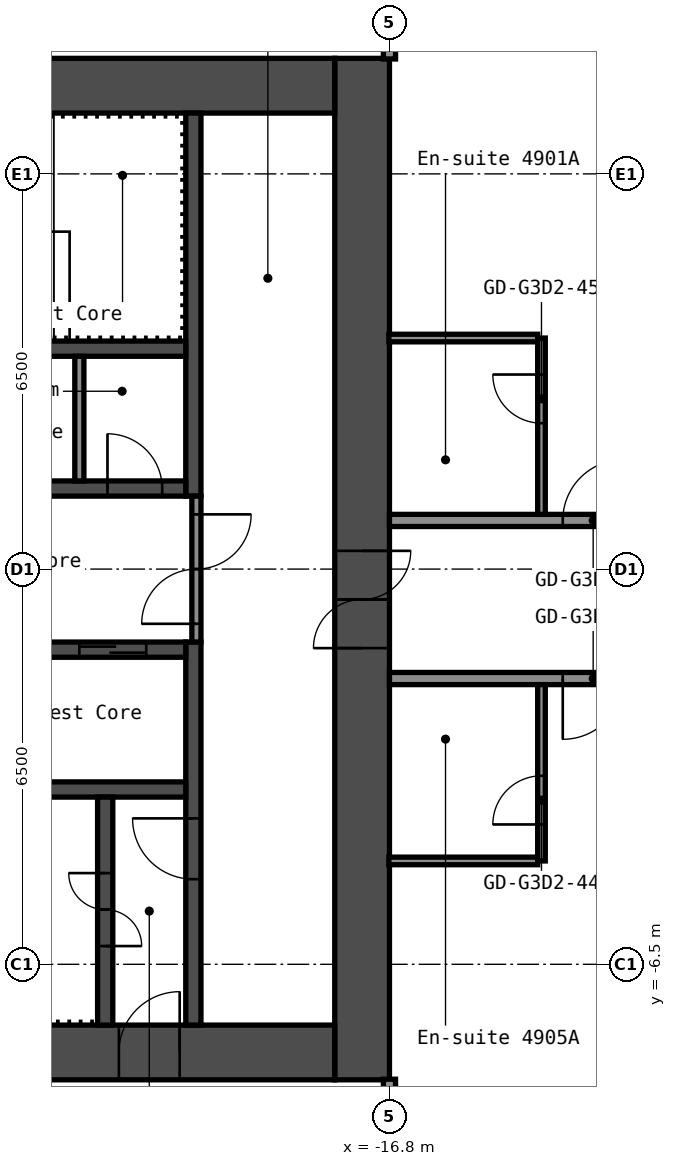
"""IFC4 building model, lengths in metres.
Left out: names, types, materials, properties, quantities, classifications, styles, units other than length and angle.
Written with IfcOpenShell. Run it as: python <this file> out.ifc"""

import sys

from ifc_helpers import new_model, si_unit, direction, frame, frame_2d, origin, place, context, subcontext, project, spatial, rectangle, extrude, element, fill, save


model = new_model("IFC4")
c1 = context("Model", 3, precision=1e-05, world=origin(), true_north=direction((0.0, 1.0)))
c2 = subcontext(c1, "Body", "Model", "MODEL_VIEW")
j1 = project(units=[si_unit("LENGTHUNIT", "METRE"), si_unit("PLANEANGLEUNIT", "RADIAN")], contexts=[c1])
p1 = place(None, origin())
s1 = spatial("IfcSite", under=j1, at=p1, CompositionType="ELEMENT")
p2 = place(p1, origin())
s2 = spatial("IfcBuilding", under=s1, at=p2, CompositionType="ELEMENT")
p3 = place(p2, frame((0.0, 0.0, 172.6)))
s3 = spatial("IfcBuildingStorey", under=s2, at=p3, CompositionType="ELEMENT", Elevation=172.6)
p4 = place(p3, frame((-17.25, -8.4, 0.0), z_axis=(0.0, 0.0, 1.0), x_axis=(0.0, 1.0, 0.0)))
e1 = element("IfcWall", 1, at=p4, inside=s3, PredefinedType="SHEAR", context=c2, shape_type="SweptSolid", body=[
    extrude(rectangle(XDim=16.8, YDim=0.9, at=frame_2d((8.4, 0.0))), origin(), (0.0, 0.0, 1.0), 2.9),
])
p5 = place(p4, frame((7.1, 0.0, 0.0)))
e2 = element("IfcOpeningElement", 2, at=p5, cuts=e1, PredefinedType="OPENING", context=c2, shape_type="SweptSolid", body=[
    extrude(rectangle(XDim=1.6, YDim=2.1, at=frame_2d((0.8, 1.05))), frame((0.0, 0.46, 0.0), z_axis=(0.0, -1.0, 0.0), x_axis=(1.0, 0.0, 0.0)), (0.0, 0.0, 1.0), 0.92),
])
p6 = place(p3, frame((-32.7, 7.95, 0.0), z_axis=(0.0, 0.0, 1.0), x_axis=(1.0, 0.0, 0.0)))
e3 = element("IfcWall", 3, at=p6, inside=s3, PredefinedType="SHEAR", context=c2, shape_type="SweptSolid", body=[
    extrude(rectangle(XDim=15.0, YDim=0.9, at=frame_2d((7.5, 0.0))), origin(), (0.0, 0.0, 1.0), 2.9),
])
p7 = place(p6, frame((3.4, 0.0, 0.0)))
e4 = element("IfcOpeningElement", 4, at=p7, cuts=e3, PredefinedType="OPENING", context=c2, shape_type="SweptSolid", body=[
    extrude(rectangle(XDim=1.2, YDim=2.1, at=frame_2d((0.6, 1.05))), frame((0.0, 0.46, 0.0), z_axis=(0.0, -1.0, 0.0), x_axis=(1.0, 0.0, 0.0)), (0.0, 0.0, 1.0), 0.92),
])
p8 = place(p6, frame((0.75, 0.0, 0.0)))
e5 = element("IfcOpeningElement", 5, at=p8, cuts=e3, PredefinedType="OPENING", context=c2, shape_type="SweptSolid", body=[
    extrude(rectangle(XDim=0.9, YDim=2.1, at=frame_2d((0.45, 1.05))), frame((0.0, 0.46, 0.0), z_axis=(0.0, -1.0, 0.0), x_axis=(1.0, 0.0, 0.0)), (0.0, 0.0, 1.0), 0.92),
])
p9 = place(p3, frame((-32.7, -7.95, 0.0), z_axis=(0.0, 0.0, 1.0), x_axis=(1.0, 0.0, 0.0)))
e6 = element("IfcWall", 6, at=p9, inside=s3, PredefinedType="SHEAR", context=c2, shape_type="SweptSolid", body=[
    extrude(rectangle(XDim=15.0, YDim=0.9, at=frame_2d((7.5, 0.0))), origin(), (0.0, 0.0, 1.0), 2.9),
])
p10 = place(p9, frame((11.45, 0.0, 0.0)))
e7 = element("IfcOpeningElement", 7, at=p10, cuts=e6, PredefinedType="OPENING", context=c2, shape_type="SweptSolid", body=[
    extrude(rectangle(XDim=1.0, YDim=2.1, at=frame_2d((0.5, 1.05))), frame((0.0, 0.46, 0.0), z_axis=(0.0, -1.0, 0.0), x_axis=(1.0, 0.0, 0.0)), (0.0, 0.0, 1.0), 0.92),
])
p11 = place(p3, frame((-20.025, 1.2, 0.0), z_axis=(0.0, 0.0, 1.0), x_axis=(0.0, 1.0, 0.0)))
e8 = element("IfcWall", 8, at=p11, inside=s3, PredefinedType="SHEAR", context=c2, shape_type="SweptSolid", body=[
    extrude(rectangle(XDim=6.3, YDim=0.25, at=frame_2d((3.15, 0.0))), origin(), (0.0, 0.0, 1.0), 2.9),
])
p12 = place(p3, frame((-20.025, -7.5, 0.0), z_axis=(0.0, 0.0, 1.0), x_axis=(0.0, 1.0, 0.0)))
e9 = element("IfcWall", 9, at=p12, inside=s3, PredefinedType="SHEAR", context=c2, shape_type="SweptSolid", body=[
    extrude(rectangle(XDim=6.3, YDim=0.25, at=frame_2d((3.15, 0.0))), origin(), (0.0, 0.0, 1.0), 2.9),
])
p13 = place(p12, frame((2.4, 0.0, 0.0)))
e10 = element("IfcOpeningElement", 10, at=p13, cuts=e9, PredefinedType="OPENING", context=c2, shape_type="SweptSolid", body=[
    extrude(rectangle(XDim=1.0, YDim=2.1, at=frame_2d((0.5, 1.05))), frame((0.0, 0.135, 0.0), z_axis=(0.0, -1.0, 0.0), x_axis=(1.0, 0.0, 0.0)), (0.0, 0.0, 1.0), 0.27),
])
p14 = place(p3, frame((-27.65, 1.325, 0.0), z_axis=(0.0, 0.0, 1.0), x_axis=(1.0, 0.0, 0.0)))
e11 = element("IfcWall", 11, at=p14, inside=s3, PredefinedType="SHEAR", context=c2, shape_type="SweptSolid", body=[
    extrude(rectangle(XDim=7.5, YDim=0.25, at=frame_2d((3.75, 0.0))), origin(), (0.0, 0.0, 1.0), 2.9),
])
p15 = place(p14, frame((6.212, 0.0, 0.0)))
e12 = element("IfcOpeningElement", 12, at=p15, cuts=e11, PredefinedType="OPENING", context=c2, shape_type="SweptSolid", body=[
    extrude(rectangle(XDim=0.9, YDim=2.1, at=frame_2d((0.45, 1.05))), frame((0.0, 0.135, 0.0), z_axis=(0.0, -1.0, 0.0), x_axis=(1.0, 0.0, 0.0)), (0.0, 0.0, 1.0), 0.27),
])
p16 = place(p14, frame((2.512, 0.0, 0.0)))
e13 = element("IfcOpeningElement", 13, at=p16, cuts=e11, PredefinedType="OPENING", context=c2, shape_type="SweptSolid", body=[
    extrude(rectangle(XDim=0.9, YDim=2.1, at=frame_2d((0.45, 1.05))), frame((0.0, 0.135, 0.0), z_axis=(0.0, -1.0, 0.0), x_axis=(1.0, 0.0, 0.0)), (0.0, 0.0, 1.0), 0.27),
])
p17 = place(p3, frame((-27.65, 3.625, 0.0), z_axis=(0.0, 0.0, 1.0), x_axis=(1.0, 0.0, 0.0)))
e14 = element("IfcWall", 14, at=p17, inside=s3, PredefinedType="SHEAR", context=c2, shape_type="SweptSolid", body=[
    extrude(rectangle(XDim=7.5, YDim=0.25, at=frame_2d((3.75, 0.0))), origin(), (0.0, 0.0, 1.0), 2.9),
])
p18 = place(p3, frame((-27.65, -1.325, 0.0), z_axis=(0.0, 0.0, 1.0), x_axis=(1.0, 0.0, 0.0)))
e15 = element("IfcWall", 15, at=p18, inside=s3, PredefinedType="SHEAR", context=c2, shape_type="SweptSolid", body=[
    extrude(rectangle(XDim=7.5, YDim=0.25, at=frame_2d((3.75, 0.0))), origin(), (0.0, 0.0, 1.0), 2.9),
])
p19 = place(p18, frame((5.75, 0.0, 0.0)))
e16 = element("IfcOpeningElement", 16, at=p19, cuts=e15, PredefinedType="OPENING", context=c2, shape_type="SweptSolid", body=[
    extrude(rectangle(XDim=1.1, YDim=2.1, at=frame_2d((0.55, 1.05))), frame((0.0, 0.135, 0.0), z_axis=(0.0, -1.0, 0.0), x_axis=(1.0, 0.0, 0.0)), (0.0, 0.0, 1.0), 0.27),
])
p20 = place(p18, frame((3.35, 0.0, 0.0)))
e17 = element("IfcOpeningElement", 17, at=p20, cuts=e15, PredefinedType="OPENING", context=c2, shape_type="SweptSolid", body=[
    extrude(rectangle(XDim=1.1, YDim=2.1, at=frame_2d((0.55, 1.05))), frame((0.0, 0.135, 0.0), z_axis=(0.0, -1.0, 0.0), x_axis=(1.0, 0.0, 0.0)), (0.0, 0.0, 1.0), 0.27),
])
p21 = place(p18, frame((0.95, 0.0, 0.0)))
e18 = element("IfcOpeningElement", 18, at=p21, cuts=e15, PredefinedType="OPENING", context=c2, shape_type="SweptSolid", body=[
    extrude(rectangle(XDim=1.1, YDim=2.1, at=frame_2d((0.55, 1.05))), frame((0.0, 0.135, 0.0), z_axis=(0.0, -1.0, 0.0), x_axis=(1.0, 0.0, 0.0)), (0.0, 0.0, 1.0), 0.27),
])
p22 = place(p3, frame((-27.65, -3.625, 0.0), z_axis=(0.0, 0.0, 1.0), x_axis=(1.0, 0.0, 0.0)))
e19 = element("IfcWall", 19, at=p22, inside=s3, PredefinedType="SHEAR", context=c2, shape_type="SweptSolid", body=[
    extrude(rectangle(XDim=7.5, YDim=0.25, at=frame_2d((3.75, 0.0))), origin(), (0.0, 0.0, 1.0), 2.9),
])
p23 = place(p3, frame((-21.475, -7.5, 0.0), z_axis=(0.0, 0.0, 1.0), x_axis=(0.0, 1.0, 0.0)))
e20 = element("IfcWall", 20, at=p23, inside=s3, PredefinedType="SHEAR", context=c2, shape_type="SweptSolid", body=[
    extrude(rectangle(XDim=3.75, YDim=0.25, at=frame_2d((1.875, 0.0))), origin(), (0.0, 0.0, 1.0), 2.9),
])
p24 = place(p23, frame((1.3, 0.0, 0.0)))
e21 = element("IfcOpeningElement", 21, at=p24, cuts=e20, PredefinedType="OPENING", context=c2, shape_type="SweptSolid", body=[
    extrude(rectangle(XDim=1.2, YDim=2.1, at=frame_2d((0.6, 1.05))), frame((0.0, 0.135, 0.0), z_axis=(0.0, -1.0, 0.0), x_axis=(1.0, 0.0, 0.0)), (0.0, 0.0, 1.0), 0.27),
])
p25 = place(p3, frame((-19.975, -1.2, 0.0), z_axis=(0.0, 0.0, 1.0), x_axis=(0.0, 1.0, 0.0)))
e22 = element("IfcWall", 22, at=p25, inside=s3, PredefinedType="PARTITIONING", context=c2, shape_type="SweptSolid", body=[
    extrude(rectangle(XDim=2.4, YDim=0.15, at=frame_2d((1.2, 0.0))), origin(), (0.0, 0.0, 1.0), 2.9),
])
p26 = place(p25, frame((0.3, 0.0, 0.0)))
e23 = element("IfcOpeningElement", 23, at=p26, cuts=e22, PredefinedType="OPENING", context=c2, shape_type="SweptSolid", body=[
    extrude(rectangle(XDim=1.8, YDim=2.1, at=frame_2d((0.9, 1.05))), frame((0.0, 0.085, 0.0), z_axis=(0.0, -1.0, 0.0), x_axis=(1.0, 0.0, 0.0)), (0.0, 0.0, 1.0), 0.17),
])
p27 = place(p3, frame((-21.9, 1.45, 0.0), z_axis=(0.0, 0.0, 1.0), x_axis=(0.0, 1.0, 0.0)))
e24 = element("IfcWall", 24, at=p27, inside=s3, PredefinedType="PARTITIONING", context=c2, shape_type="SweptSolid", body=[
    extrude(rectangle(XDim=2.05, YDim=0.15, at=frame_2d((1.025, 0.0))), origin(), (0.0, 0.0, 1.0), 2.9),
])
p28 = place(p3, frame((-16.81, -4.8, 0.0), z_axis=(0.0, 0.0, 1.0), x_axis=(1.0, 0.0, 0.0)))
e25 = element("IfcWall", 25, at=p28, inside=s3, PredefinedType="PARTITIONING", context=c2, shape_type="SweptSolid", body=[
    extrude(rectangle(XDim=2.448, YDim=0.125, at=frame_2d((1.224, 0.0))), origin(), (0.0, 0.0, 1.0), 2.9),
])
p29 = place(p3, frame((-16.8, -1.8, 0.0), z_axis=(0.0, 0.0, 1.0), x_axis=(1.0, 0.0, 0.0)))
e26 = element("IfcWall", 26, at=p29, inside=s3, PredefinedType="PARTITIONING", context=c2, shape_type="SweptSolid", body=[
    extrude(rectangle(XDim=33.6, YDim=0.2, at=frame_2d((16.8, 0.0))), origin(), (0.0, 0.0, 1.0), 2.9),
])
p30 = place(p29, frame((2.85, 0.0, 0.0)))
e27 = element("IfcOpeningElement", 27, at=p30, cuts=e26, PredefinedType="OPENING", context=c2, shape_type="SweptSolid", body=[
    extrude(rectangle(XDim=1.0, YDim=2.1, at=frame_2d((0.5, 1.05))), frame((0.0, 0.11, 0.0), z_axis=(0.0, -1.0, 0.0), x_axis=(1.0, 0.0, 0.0)), (0.0, 0.0, 1.0), 0.22),
])
p31 = place(p29, frame((4.55, 0.0, 0.0)))
e28 = element("IfcOpeningElement", 28, at=p31, cuts=e26, PredefinedType="OPENING", context=c2, shape_type="SweptSolid", body=[
    extrude(rectangle(XDim=1.0, YDim=2.1, at=frame_2d((0.5, 1.05))), frame((0.0, 0.11, 0.0), z_axis=(0.0, -1.0, 0.0), x_axis=(1.0, 0.0, 0.0)), (0.0, 0.0, 1.0), 0.22),
])
p32 = place(p29, frame((12.1, 0.0, 0.0)))
e29 = element("IfcOpeningElement", 29, at=p32, cuts=e26, PredefinedType="OPENING", context=c2, shape_type="SweptSolid", body=[
    extrude(rectangle(XDim=1.0, YDim=2.1, at=frame_2d((0.5, 1.05))), frame((0.0, 0.11, 0.0), z_axis=(0.0, -1.0, 0.0), x_axis=(1.0, 0.0, 0.0)), (0.0, 0.0, 1.0), 0.22),
])
p33 = place(p29, frame((19.65, 0.0, 0.0)))
e30 = element("IfcOpeningElement", 30, at=p33, cuts=e26, PredefinedType="OPENING", context=c2, shape_type="SweptSolid", body=[
    extrude(rectangle(XDim=1.0, YDim=2.1, at=frame_2d((0.5, 1.05))), frame((0.0, 0.11, 0.0), z_axis=(0.0, -1.0, 0.0), x_axis=(1.0, 0.0, 0.0)), (0.0, 0.0, 1.0), 0.22),
])
p34 = place(p29, frame((21.35, 0.0, 0.0)))
e31 = element("IfcOpeningElement", 31, at=p34, cuts=e26, PredefinedType="OPENING", context=c2, shape_type="SweptSolid", body=[
    extrude(rectangle(XDim=1.0, YDim=2.1, at=frame_2d((0.5, 1.05))), frame((0.0, 0.11, 0.0), z_axis=(0.0, -1.0, 0.0), x_axis=(1.0, 0.0, 0.0)), (0.0, 0.0, 1.0), 0.22),
])
p35 = place(p29, frame((27.2, 0.0, 0.0)))
e32 = element("IfcOpeningElement", 32, at=p35, cuts=e26, PredefinedType="OPENING", context=c2, shape_type="SweptSolid", body=[
    extrude(rectangle(XDim=1.0, YDim=2.1, at=frame_2d((0.5, 1.05))), frame((0.0, 0.11, 0.0), z_axis=(0.0, -1.0, 0.0), x_axis=(1.0, 0.0, 0.0)), (0.0, 0.0, 1.0), 0.22),
])
p36 = place(p3, frame((-16.8, 0.8, 0.0), z_axis=(0.0, 0.0, 1.0), x_axis=(1.0, 0.0, 0.0)))
e33 = element("IfcWall", 33, at=p36, inside=s3, PredefinedType="PARTITIONING", context=c2, shape_type="SweptSolid", body=[
    extrude(rectangle(XDim=33.6, YDim=0.2, at=frame_2d((16.8, 0.0))), origin(), (0.0, 0.0, 1.0), 2.9),
])
p37 = place(p36, frame((2.85, 0.0, 0.0)))
e34 = element("IfcOpeningElement", 34, at=p37, cuts=e33, PredefinedType="OPENING", context=c2, shape_type="SweptSolid", body=[
    extrude(rectangle(XDim=1.0, YDim=2.1, at=frame_2d((0.5, 1.05))), frame((0.0, 0.11, 0.0), z_axis=(0.0, -1.0, 0.0), x_axis=(1.0, 0.0, 0.0)), (0.0, 0.0, 1.0), 0.22),
])
p38 = place(p36, frame((4.55, 0.0, 0.0)))
e35 = element("IfcOpeningElement", 35, at=p38, cuts=e33, PredefinedType="OPENING", context=c2, shape_type="SweptSolid", body=[
    extrude(rectangle(XDim=1.0, YDim=2.1, at=frame_2d((0.5, 1.05))), frame((0.0, 0.11, 0.0), z_axis=(0.0, -1.0, 0.0), x_axis=(1.0, 0.0, 0.0)), (0.0, 0.0, 1.0), 0.22),
])
p39 = place(p36, frame((13.8, 0.0, 0.0)))
e36 = element("IfcOpeningElement", 36, at=p39, cuts=e33, PredefinedType="OPENING", context=c2, shape_type="SweptSolid", body=[
    extrude(rectangle(XDim=1.0, YDim=2.1, at=frame_2d((0.5, 1.05))), frame((0.0, 0.11, 0.0), z_axis=(0.0, -1.0, 0.0), x_axis=(1.0, 0.0, 0.0)), (0.0, 0.0, 1.0), 0.22),
])
p40 = place(p36, frame((19.65, 0.0, 0.0)))
e37 = element("IfcOpeningElement", 37, at=p40, cuts=e33, PredefinedType="OPENING", context=c2, shape_type="SweptSolid", body=[
    extrude(rectangle(XDim=1.0, YDim=2.1, at=frame_2d((0.5, 1.05))), frame((0.0, 0.11, 0.0), z_axis=(0.0, -1.0, 0.0), x_axis=(1.0, 0.0, 0.0)), (0.0, 0.0, 1.0), 0.22),
])
p41 = place(p36, frame((21.35, 0.0, 0.0)))
e38 = element("IfcOpeningElement", 38, at=p41, cuts=e33, PredefinedType="OPENING", context=c2, shape_type="SweptSolid", body=[
    extrude(rectangle(XDim=1.0, YDim=2.1, at=frame_2d((0.5, 1.05))), frame((0.0, 0.11, 0.0), z_axis=(0.0, -1.0, 0.0), x_axis=(1.0, 0.0, 0.0)), (0.0, 0.0, 1.0), 0.22),
])
p42 = place(p36, frame((27.1, 0.0, 0.0)))
e39 = element("IfcOpeningElement", 39, at=p42, cuts=e33, PredefinedType="OPENING", context=c2, shape_type="SweptSolid", body=[
    extrude(rectangle(XDim=1.0, YDim=2.1, at=frame_2d((0.5, 1.05))), frame((0.0, 0.11, 0.0), z_axis=(0.0, -1.0, 0.0), x_axis=(1.0, 0.0, 0.0)), (0.0, 0.0, 1.0), 0.22),
])
p43 = place(p3, frame((-16.81, 3.8, 0.0), z_axis=(0.0, 0.0, 1.0), x_axis=(1.0, 0.0, 0.0)))
e40 = element("IfcWall", 40, at=p43, inside=s3, PredefinedType="PARTITIONING", context=c2, shape_type="SweptSolid", body=[
    extrude(rectangle(XDim=2.448, YDim=0.125, at=frame_2d((1.224, 0.0))), origin(), (0.0, 0.0, 1.0), 2.9),
])
p44 = place(p3, frame((-16.8, -19.3, 0.0), z_axis=(0.0, 0.0, 1.0), x_axis=(0.0, 1.0, 0.0)))
e41 = element("IfcWall", 41, at=p44, inside=s3, PredefinedType="PARTITIONING", context=c2, shape_type="SweptSolid", body=[
    extrude(rectangle(XDim=10.91, YDim=0.2, at=frame_2d((5.455, 0.0))), origin(), (0.0, 0.0, 1.0), 2.9),
])
p45 = place(p3, frame((-16.8, 8.39, 0.0), z_axis=(0.0, 0.0, 1.0), x_axis=(0.0, 1.0, 0.0)))
e42 = element("IfcWall", 42, at=p45, inside=s3, PredefinedType="PARTITIONING", context=c2, shape_type="SweptSolid", body=[
    extrude(rectangle(XDim=9.91, YDim=0.2, at=frame_2d((4.955, 0.0))), origin(), (0.0, 0.0, 1.0), 2.9),
])
p46 = place(p3, frame((-14.3, -4.8, 0.0), z_axis=(0.0, 0.0, 1.0), x_axis=(0.0, 1.0, 0.0)))
e43 = element("IfcWall", 43, at=p46, inside=s3, PredefinedType="PARTITIONING", context=c2, shape_type="SweptSolid", body=[
    extrude(rectangle(XDim=2.9, YDim=0.125, at=frame_2d((1.45, 0.0))), origin(), (0.0, 0.0, 1.0), 2.9),
])
p47 = place(p46, frame((0.6, 0.0, 0.0)))
e44 = element("IfcOpeningElement", 44, at=p47, cuts=e43, PredefinedType="OPENING", context=c2, shape_type="SweptSolid", body=[
    extrude(rectangle(XDim=0.8, YDim=2.1, at=frame_2d((0.4, 1.05))), frame((0.0, 0.073, 0.0), z_axis=(0.0, -1.0, 0.0), x_axis=(1.0, 0.0, 0.0)), (0.0, 0.0, 1.0), 0.145),
])
p48 = place(p3, frame((-14.3, 0.9, 0.0), z_axis=(0.0, 0.0, 1.0), x_axis=(0.0, 1.0, 0.0)))
e45 = element("IfcWall", 45, at=p48, inside=s3, PredefinedType="PARTITIONING", context=c2, shape_type="SweptSolid", body=[
    extrude(rectangle(XDim=2.9, YDim=0.125, at=frame_2d((1.45, 0.0))), origin(), (0.0, 0.0, 1.0), 2.9),
])
p49 = place(p48, frame((1.5, 0.0, 0.0)))
e46 = element("IfcOpeningElement", 46, at=p49, cuts=e45, PredefinedType="OPENING", context=c2, shape_type="SweptSolid", body=[
    extrude(rectangle(XDim=0.8, YDim=2.1, at=frame_2d((0.4, 1.05))), frame((0.0, 0.073, 0.0), z_axis=(0.0, -1.0, 0.0), x_axis=(1.0, 0.0, 0.0)), (0.0, 0.0, 1.0), 0.145),
])
p50 = place(p5, origin())
e47 = element("IfcDoor", 47, at=p50, inside=s3, OperationType="DOUBLE_DOOR_SINGLE_SWING", PredefinedType="DOOR", context=c2, shape_type="SweptSolid", body=[
    extrude(rectangle(XDim=1.6, YDim=2.1, at=frame_2d((0.8, 1.05))), frame((0.0, 0.025, 0.0), z_axis=(0.0, -1.0, 0.0), x_axis=(1.0, 0.0, 0.0)), (0.0, 0.0, 1.0), 0.05),
])
fill(e2, e47)
p51 = place(p10, origin())
e48 = element("IfcDoor", 48, at=p51, inside=s3, OperationType="SINGLE_SWING_LEFT", PredefinedType="DOOR", context=c2, shape_type="SweptSolid", body=[
    extrude(rectangle(XDim=1.0, YDim=2.1, at=frame_2d((0.5, 1.05))), frame((0.0, 0.025, 0.0), z_axis=(0.0, -1.0, 0.0), x_axis=(1.0, 0.0, 0.0)), (0.0, 0.0, 1.0), 0.05),
])
fill(e7, e48)
p52 = place(p24, origin())
e49 = element("IfcDoor", 49, at=p52, inside=s3, OperationType="DOUBLE_DOOR_SINGLE_SWING", PredefinedType="DOOR", context=c2, shape_type="SweptSolid", body=[
    extrude(rectangle(XDim=1.2, YDim=2.1, at=frame_2d((0.6, 1.05))), frame((0.0, 0.025, 0.0), z_axis=(0.0, -1.0, 0.0), x_axis=(1.0, 0.0, 0.0)), (0.0, 0.0, 1.0), 0.05),
])
fill(e21, e49)
p53 = place(p13, origin())
e50 = element("IfcDoor", 50, at=p53, inside=s3, OperationType="SINGLE_SWING_LEFT", PredefinedType="DOOR", context=c2, shape_type="SweptSolid", body=[
    extrude(rectangle(XDim=1.0, YDim=2.1, at=frame_2d((0.5, 1.05))), frame((0.0, 0.025, 0.0), z_axis=(0.0, -1.0, 0.0), x_axis=(1.0, 0.0, 0.0)), (0.0, 0.0, 1.0), 0.05),
])
fill(e10, e50)
p54 = place(p26, origin())
e51 = element("IfcDoor", 51, at=p54, inside=s3, OperationType="DOUBLE_DOOR_SINGLE_SWING", PredefinedType="DOOR", context=c2, shape_type="SweptSolid", body=[
    extrude(rectangle(XDim=1.8, YDim=2.1, at=frame_2d((0.9, 1.05))), frame((0.0, 0.025, 0.0), z_axis=(0.0, -1.0, 0.0), x_axis=(1.0, 0.0, 0.0)), (0.0, 0.0, 1.0), 0.05),
])
fill(e23, e51)
p55 = place(p15, origin())
e52 = element("IfcDoor", 52, at=p55, inside=s3, OperationType="SINGLE_SWING_RIGHT", PredefinedType="DOOR", context=c2, shape_type="SweptSolid", body=[
    extrude(rectangle(XDim=0.9, YDim=2.1, at=frame_2d((0.45, 1.05))), frame((0.0, 0.025, 0.0), z_axis=(0.0, -1.0, 0.0), x_axis=(1.0, 0.0, 0.0)), (0.0, 0.0, 1.0), 0.05),
])
fill(e12, e52)
p56 = place(p19, origin())
e53 = element("IfcDoor", 53, at=p56, inside=s3, OperationType="DOUBLE_DOOR_SLIDING", PredefinedType="DOOR", context=c2, shape_type="SweptSolid", body=[
    extrude(rectangle(XDim=1.1, YDim=2.1, at=frame_2d((0.55, 1.05))), frame((0.0, 0.025, 0.0), z_axis=(0.0, -1.0, 0.0), x_axis=(1.0, 0.0, 0.0)), (0.0, 0.0, 1.0), 0.05),
])
fill(e16, e53)
p57 = place(p30, origin())
e54 = element("IfcDoor", 54, at=p57, inside=s3, OperationType="SINGLE_SWING_LEFT", PredefinedType="DOOR", context=c2, shape_type="SweptSolid", body=[
    extrude(rectangle(XDim=1.0, YDim=2.1, at=frame_2d((0.5, 1.05))), frame((0.0, 0.025, 0.0), z_axis=(0.0, -1.0, 0.0), x_axis=(1.0, 0.0, 0.0)), (0.0, 0.0, 1.0), 0.05),
])
fill(e27, e54)
p58 = place(p37, origin())
e55 = element("IfcDoor", 55, at=p58, inside=s3, OperationType="SINGLE_SWING_LEFT", PredefinedType="DOOR", context=c2, shape_type="SweptSolid", body=[
    extrude(rectangle(XDim=1.0, YDim=2.1, at=frame_2d((0.5, 1.05))), frame((0.0, 0.025, 0.0), z_axis=(0.0, -1.0, 0.0), x_axis=(1.0, 0.0, 0.0)), (0.0, 0.0, 1.0), 0.05),
])
fill(e34, e55)
p59 = place(p47, origin())
e56 = element("IfcDoor", 56, at=p59, inside=s3, OperationType="SINGLE_SWING_RIGHT", PredefinedType="DOOR", context=c2, shape_type="SweptSolid", body=[
    extrude(rectangle(XDim=0.8, YDim=2.1, at=frame_2d((0.4, 1.05))), frame((0.0, 0.025, 0.0), z_axis=(0.0, -1.0, 0.0), x_axis=(1.0, 0.0, 0.0)), (0.0, 0.0, 1.0), 0.05),
])
fill(e44, e56)
p60 = place(p49, origin())
e57 = element("IfcDoor", 57, at=p60, inside=s3, OperationType="SINGLE_SWING_LEFT", PredefinedType="DOOR", context=c2, shape_type="SweptSolid", body=[
    extrude(rectangle(XDim=0.8, YDim=2.1, at=frame_2d((0.4, 1.05))), frame((0.0, 0.025, 0.0), z_axis=(0.0, -1.0, 0.0), x_axis=(1.0, 0.0, 0.0)), (0.0, 0.0, 1.0), 0.05),
])
fill(e46, e57)
save(model, sys.argv[1])
